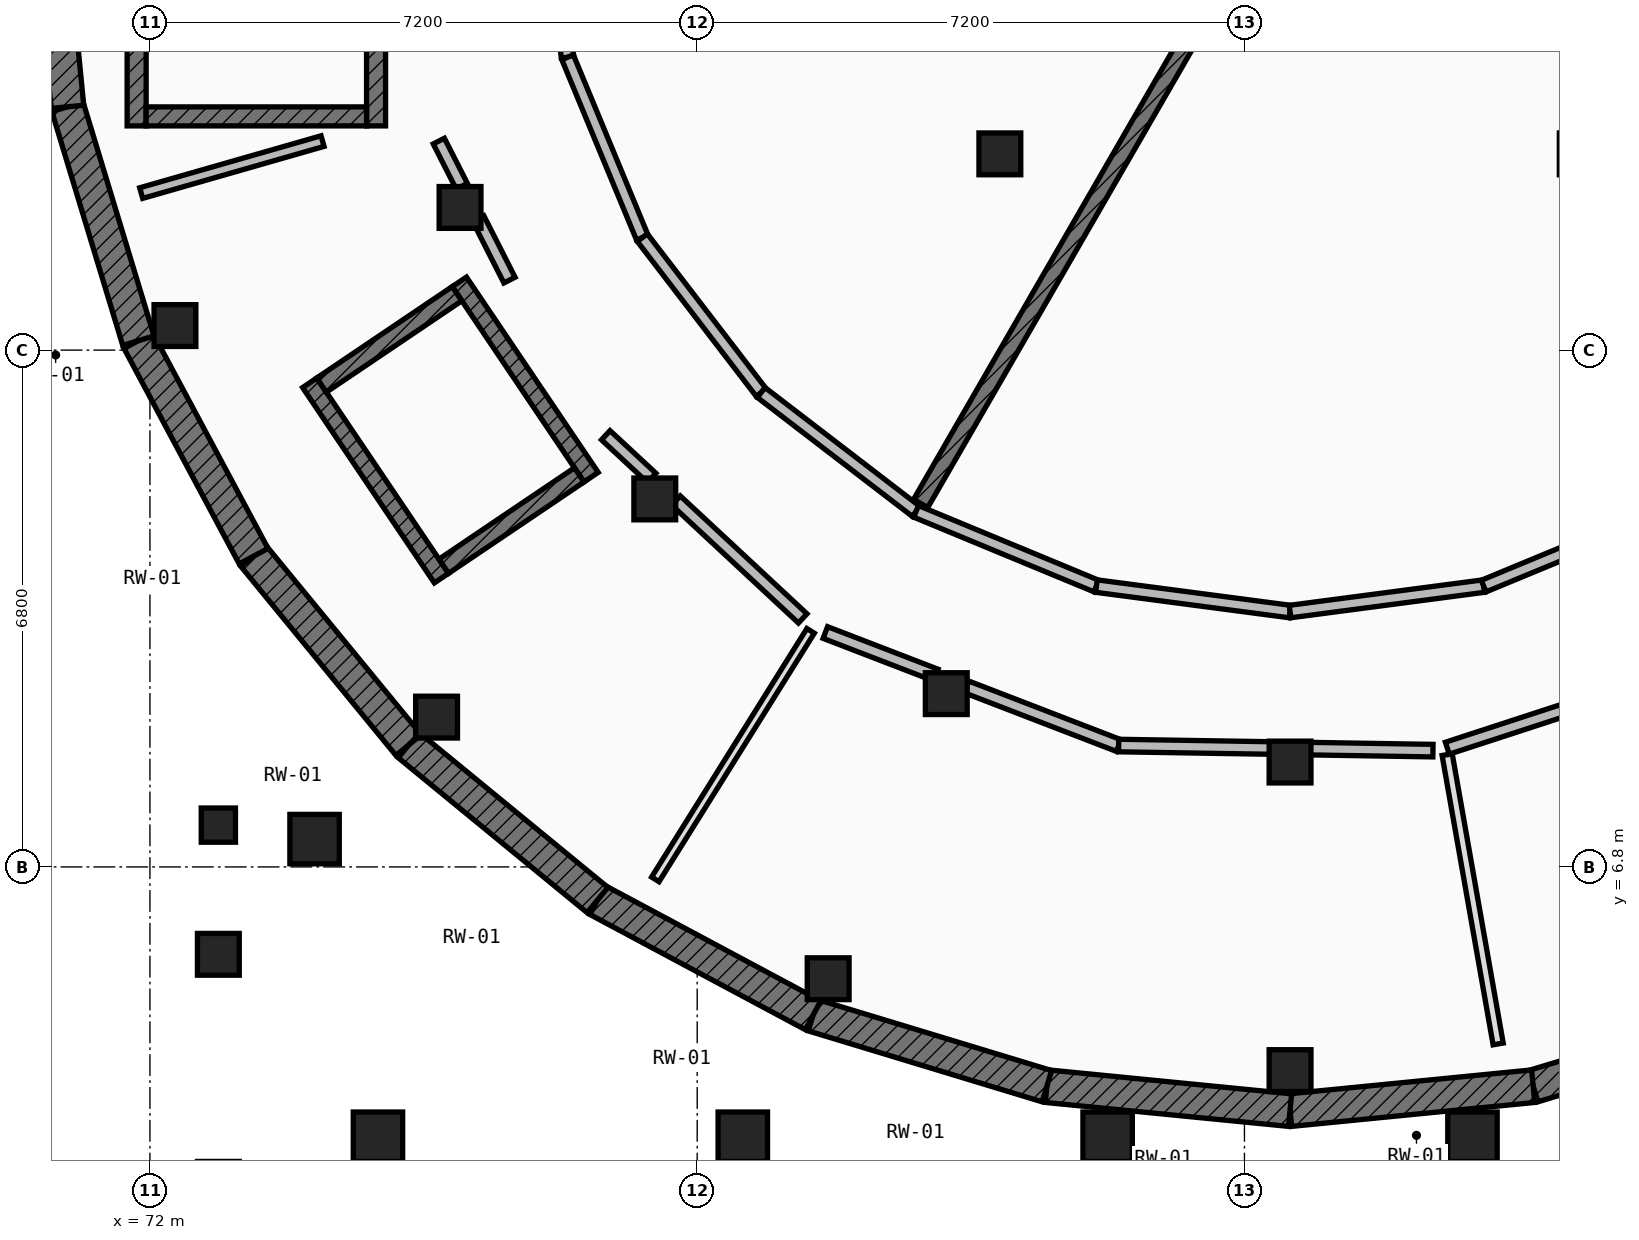
"""IFC4 building model, lengths in metres.
Left out: names, types, materials, properties, quantities, classifications, styles, units other than length and angle.
Written with IfcOpenShell. Run it as: python <this file> out.ifc"""

import sys

from ifc_helpers import new_model, si_unit, direction, frame, frame_2d, origin, origin_2d, place, context, subcontext, project, spatial, rectangle, extrude, element, fill, save


model = new_model("IFC4")
c1 = context("Model", 3, precision=1e-05, world=origin(), true_north=direction((0.0, 1.0)))
c2 = subcontext(c1, "Body", "Model", "MODEL_VIEW")
j1 = project(units=[si_unit("LENGTHUNIT", "METRE"), si_unit("PLANEANGLEUNIT", "RADIAN")], contexts=[c1])
p1 = place(None, origin())
s1 = spatial("IfcSite", under=j1, at=p1, CompositionType="ELEMENT")
p2 = place(p1, origin())
s2 = spatial("IfcBuilding", under=s1, at=p2, CompositionType="ELEMENT")
p3 = place(p2, frame((0.0, 0.0, -4.55)))
s3 = spatial("IfcBuildingStorey", under=s2, at=p3, CompositionType="ELEMENT", Elevation=-4.55)
for number, where, z_axis, x_axis in (
    (1, (72.329, 13.923, 0.0), (0.0, 0.0, 1.0), (1.0, 0.0, 0.0)),
    (2, (75.771, 8.771, 0.0), (0.0, 0.0, 1.0), (1.0, 0.0, 0.0)),
    (3, (80.923, 5.329, 0.0), (0.0, 0.0, 1.0), (1.0, 0.0, 0.0)),
    (4, (87.0, 4.12, 0.0), (0.0, 0.0, 1.0), (1.0, 0.0, 0.0)),
    (5, (76.08, 15.477, 0.0), (0.0, 0.0, 1.0), (1.0, 0.0, 0.0)),
    (6, (78.642, 11.642, 0.0), (0.0, 0.0, 1.0), (1.0, 0.0, 0.0)),
    (7, (82.477, 9.08, 0.0), (0.0, 0.0, 1.0), (1.0, 0.0, 0.0)),
    (8, (87.0, 8.18, 0.0), (0.0, 0.0, 1.0), (1.0, 0.0, 0.0)),
    (9, (83.182, 16.182, 0.0), (0.0, 0.0, 1.0), (1.0, 0.0, 0.0)),
):
    element("IfcColumn", number, at=place(p3, frame(where, z_axis=z_axis, x_axis=x_axis)), inside=s3, PredefinedType="COLUMN", context=c2, shape_type="SweptSolid", body=[
        extrude(rectangle(XDim=0.55, YDim=0.55, at=origin_2d()), origin(), (0.0, 0.0, 1.0), 4.55),
    ])
for number, where, z_axis, x_axis in (
    (10, (75.0, 3.25, 0.0), (0.0, 0.0, 1.0), (1.0, 0.0, 0.0)),
    (11, (79.8, 3.25, 0.0), (0.0, 0.0, 1.0), (1.0, 0.0, 0.0)),
    (12, (84.6, 3.25, 0.0), (0.0, 0.0, 1.0), (1.0, 0.0, 0.0)),
    (13, (89.4, 3.25, 0.0), (0.0, 0.0, 1.0), (1.0, 0.0, 0.0)),
):
    element("IfcColumn", number, at=place(p3, frame(where, z_axis=z_axis, x_axis=x_axis)), inside=s3, PredefinedType="COLUMN", context=c2, shape_type="SweptSolid", body=[
        extrude(rectangle(XDim=0.65, YDim=0.65, at=origin_2d()), origin(), (0.0, 0.0, 1.0), 4.55),
    ])
p4 = place(p3, frame((72.9, 5.65, 0.0), z_axis=(0.0, 0.0, 1.0), x_axis=(1.0, 0.0, 0.0)))
e14 = element("IfcColumn", 14, at=p4, inside=s3, PredefinedType="COLUMN", context=c2, shape_type="SweptSolid", body=[
    extrude(rectangle(XDim=0.55, YDim=0.55, at=origin_2d()), origin(), (0.0, 0.0, 1.0), 4.55),
])
p5 = place(p3, frame((74.166, 7.166, 0.0), z_axis=(0.0, 0.0, 1.0), x_axis=(1.0, 0.0, 0.0)))
e15 = element("IfcColumn", 15, at=p5, inside=s3, PredefinedType="COLUMN", context=c2, shape_type="SweptSolid", body=[
    extrude(rectangle(XDim=0.65, YDim=0.65, at=origin_2d()), origin(), (0.0, 0.0, 1.0), 4.55),
])
p6 = place(p3, frame((72.9, 7.35, 0.0), z_axis=(0.0, 0.0, 1.0), x_axis=(1.0, 0.0, 0.0)))
e16 = element("IfcColumn", 16, at=p6, inside=s3, PredefinedType="COLUMN", context=c2, shape_type="SweptSolid", body=[
    extrude(rectangle(XDim=0.45, YDim=0.45, at=origin_2d()), origin(), (0.0, 0.0, 1.0), 4.55),
])
p7 = place(p3, frame((93.276, 4.848, 0.0), z_axis=(0.0, 0.0, 1.0), x_axis=(-0.956984161567, -0.29014016356, 0.0)))
e17 = element("IfcWall", 17, at=p7, inside=s3, PredefinedType="USERDEFINED", context=c2, shape_type="SweptSolid", body=[
    extrude(rectangle(XDim=3.215, YDim=0.43, at=frame_2d((1.607, 0.0))), origin(), (0.0, 0.0, 1.0), 3.335),
])
for number, where, z_axis, x_axis in (
    (18, (90.199, 3.915, 0.0), (0.0, 0.0, 1.0), (-0.995, -0.098, 0.0)),
    (19, (87.0, 3.6, 0.0), (0.0, 0.0, 1.0), (-0.995, 0.098, 0.0)),
):
    element("IfcWall", number, at=place(p3, frame(where, z_axis=z_axis, x_axis=x_axis)), inside=s3, PredefinedType="USERDEFINED", context=c2, shape_type="SweptSolid", body=[
        extrude(rectangle(XDim=3.214, YDim=0.43, at=frame_2d((1.607, 0.0))), origin(), (0.0, 0.0, 1.0), 3.335),
    ])
for number, where, z_axis, x_axis in (
    (20, (83.801, 3.915, 0.0), (0.0, 0.0, 1.0), (-0.957, 0.29, 0.0)),
    (21, (80.724, 4.848, 0.0), (0.0, 0.0, 1.0), (-0.882, 0.472, 0.0)),
    (22, (77.889, 6.364, 0.0), (0.0, 0.0, 1.0), (-0.773, 0.634, 0.0)),
    (23, (75.403, 8.403, 0.0), (0.0, 0.0, 1.0), (-0.634, 0.773, 0.0)),
    (24, (73.364, 10.889, 0.0), (0.0, 0.0, 1.0), (-0.472, 0.882, 0.0)),
    (25, (71.848, 13.724, 0.0), (0.0, 0.0, 1.0), (-0.29, 0.957, 0.0)),
):
    element("IfcWall", number, at=place(p3, frame(where, z_axis=z_axis, x_axis=x_axis)), inside=s3, PredefinedType="USERDEFINED", context=c2, shape_type="SweptSolid", body=[
        extrude(rectangle(XDim=3.215, YDim=0.43, at=frame_2d((1.607, 0.0))), origin(), (0.0, 0.0, 1.0), 3.335),
    ])
p8 = place(p3, frame((70.915, 16.801, 0.0), z_axis=(0.0, 0.0, 1.0), x_axis=(-0.097977057849, 0.995188673637, 0.0)))
e26 = element("IfcWall", 26, at=p8, inside=s3, PredefinedType="USERDEFINED", context=c2, shape_type="SweptSolid", body=[
    extrude(rectangle(XDim=3.214, YDim=0.43, at=frame_2d((1.607, 0.0))), origin(), (0.0, 0.0, 1.0), 3.335),
])
p9 = place(p3, frame((74.975, 16.55, 0.0), z_axis=(0.0, 0.0, 1.0), x_axis=(0.0, 1.0, 0.0)))
e27 = element("IfcWall", 27, at=p9, inside=s3, PredefinedType="SHEAR", context=c2, shape_type="SweptSolid", body=[
    extrude(rectangle(XDim=6.9, YDim=0.25, at=frame_2d((3.45, 0.0))), origin(), (0.0, 0.0, 1.0), 4.135),
])
p10 = place(p9, frame((0.43, 0.0, 0.0)))
e28 = element("IfcOpeningElement", 28, at=p10, cuts=e27, PredefinedType="OPENING", context=c2, shape_type="SweptSolid", body=[
    extrude(rectangle(XDim=1.1, YDim=2.15, at=frame_2d((0.55, 1.075))), frame((0.0, 0.135, 0.0), z_axis=(0.0, -1.0, 0.0), x_axis=(1.0, 0.0, 0.0)), (0.0, 0.0, 1.0), 0.27),
])
p11 = place(p3, frame((71.825, 16.55, 0.0), z_axis=(0.0, 0.0, 1.0), x_axis=(0.0, 1.0, 0.0)))
e29 = element("IfcWall", 29, at=p11, inside=s3, PredefinedType="SHEAR", context=c2, shape_type="SweptSolid", body=[
    extrude(rectangle(XDim=6.9, YDim=0.25, at=frame_2d((3.45, 0.0))), origin(), (0.0, 0.0, 1.0), 4.135),
])
p12 = place(p3, frame((74.85, 16.675, 0.0), z_axis=(0.0, 0.0, 1.0), x_axis=(-1.0, 0.0, 0.0)))
e30 = element("IfcWall", 30, at=p12, inside=s3, PredefinedType="SHEAR", context=c2, shape_type="SweptSolid", body=[
    extrude(rectangle(XDim=2.9, YDim=0.25, at=frame_2d((1.45, 0.0))), origin(), (0.0, 0.0, 1.0), 4.135),
])
p13 = place(p3, frame((77.804, 11.928, 0.0), z_axis=(0.0, 0.0, 1.0), x_axis=(-0.559054792443, 0.829130712883, 0.0)))
e31 = element("IfcWall", 31, at=p13, inside=s3, PredefinedType="SHEAR", context=c2, shape_type="SweptSolid", body=[
    extrude(rectangle(XDim=3.1, YDim=0.225, at=frame_2d((1.55, 0.0))), origin(), (0.0, 0.0, 1.0), 4.135),
])
p14 = place(p13, frame((0.9, 0.0, 0.0)))
e32 = element("IfcOpeningElement", 32, at=p14, cuts=e31, PredefinedType="OPENING", context=c2, shape_type="SweptSolid", body=[
    extrude(rectangle(XDim=1.3, YDim=2.2, at=frame_2d((0.65, 1.1))), frame((0.0, 0.123, 0.0), z_axis=(0.0, -1.0, 0.0), x_axis=(1.0, 0.0, 0.0)), (0.0, 0.0, 1.0), 0.245),
])
p15 = place(p3, frame((75.835, 10.6, 0.0), z_axis=(0.0, 0.0, 1.0), x_axis=(-0.559091302934, 0.829106093925, 0.0)))
e33 = element("IfcWall", 33, at=p15, inside=s3, PredefinedType="SHEAR", context=c2, shape_type="SweptSolid", body=[
    extrude(rectangle(XDim=3.1, YDim=0.225, at=frame_2d((1.55, 0.0))), origin(), (0.0, 0.0, 1.0), 4.135),
])
p16 = place(p3, frame((77.648, 11.958, 0.0), z_axis=(0.0, 0.0, 1.0), x_axis=(-0.829050086962, -0.559174349652, 0.0)))
e34 = element("IfcWall", 34, at=p16, inside=s3, PredefinedType="SHEAR", context=c2, shape_type="SweptSolid", body=[
    extrude(rectangle(XDim=2.149, YDim=0.225, at=frame_2d((1.075, 0.0))), origin(), (0.0, 0.0, 1.0), 4.135),
])
p17 = place(p3, frame((76.04, 14.342, 0.0), z_axis=(0.0, 0.0, 1.0), x_axis=(-0.828997430928, -0.559252411274, 0.0)))
e35 = element("IfcWall", 35, at=p17, inside=s3, PredefinedType="SHEAR", context=c2, shape_type="SweptSolid", body=[
    extrude(rectangle(XDim=2.15, YDim=0.225, at=frame_2d((1.075, 0.0))), origin(), (0.0, 0.0, 1.0), 4.135),
])
p18 = place(p3, frame((86.55, 19.221, 0.0), z_axis=(0.0, 0.0, 1.0), x_axis=(-0.499985207697, -0.866033943956, 0.0)))
e36 = element("IfcWall", 36, at=p18, inside=s3, PredefinedType="SOLIDWALL", context=c2, shape_type="SweptSolid", body=[
    extrude(rectangle(XDim=8.821, YDim=0.215, at=frame_2d((4.41, 0.0))), origin(), (0.0, 0.0, 1.0), 2.76),
])
p19 = place(p3, frame((77.16, 20.0, 0.0), z_axis=(0.0, 0.0, 1.0), x_axis=(0.130476636685, -0.991451384224, 0.0)))
e37 = element("IfcWall", 37, at=p19, inside=s3, PredefinedType="PARTITIONING", context=c2, shape_type="SweptSolid", body=[
    extrude(rectangle(XDim=2.569, YDim=0.165, at=frame_2d((1.285, 0.0))), origin(), (0.0, 0.0, 1.0), 2.76),
])
p20 = place(p3, frame((77.495, 17.453, 0.0), z_axis=(0.0, 0.0, 1.0), x_axis=(0.382704397106, -0.923870848353, 0.0)))
e38 = element("IfcWall", 38, at=p20, inside=s3, PredefinedType="PARTITIONING", context=c2, shape_type="SweptSolid", body=[
    extrude(rectangle(XDim=2.568, YDim=0.165, at=frame_2d((1.284, 0.0))), origin(), (0.0, 0.0, 1.0), 2.76),
])
for number, where, z_axis, x_axis in (
    (39, (78.478, 15.08, 0.0), (0.0, 0.0, 1.0), (0.609, -0.793, 0.0)),
    (40, (80.042, 13.042, 0.0), (0.0, 0.0, 1.0), (0.793, -0.609, 0.0)),
):
    element("IfcWall", number, at=place(p3, frame(where, z_axis=z_axis, x_axis=x_axis)), inside=s3, PredefinedType="PARTITIONING", context=c2, shape_type="SweptSolid", body=[
        extrude(rectangle(XDim=2.569, YDim=0.165, at=frame_2d((1.285, 0.0))), origin(), (0.0, 0.0, 1.0), 2.76),
    ])
p21 = place(p3, frame((82.08, 11.478, 0.0), z_axis=(0.0, 0.0, 1.0), x_axis=(0.923870848353, -0.382704397106, 0.0)))
e41 = element("IfcWall", 41, at=p21, inside=s3, PredefinedType="PARTITIONING", context=c2, shape_type="SweptSolid", body=[
    extrude(rectangle(XDim=2.568, YDim=0.165, at=frame_2d((1.284, 0.0))), origin(), (0.0, 0.0, 1.0), 2.76),
])
for number, where, z_axis, x_axis in (
    (42, (84.453, 10.495, 0.0), (0.0, 0.0, 1.0), (0.991, -0.13, 0.0)),
    (43, (87.0, 10.16, 0.0), (0.0, 0.0, 1.0), (0.991, 0.13, 0.0)),
):
    element("IfcWall", number, at=place(p3, frame(where, z_axis=z_axis, x_axis=x_axis)), inside=s3, PredefinedType="PARTITIONING", context=c2, shape_type="SweptSolid", body=[
        extrude(rectangle(XDim=2.569, YDim=0.165, at=frame_2d((1.285, 0.0))), origin(), (0.0, 0.0, 1.0), 2.76),
    ])
p22 = place(p3, frame((89.547, 10.495, 0.0), z_axis=(0.0, 0.0, 1.0), x_axis=(0.923870848353, 0.382704397106, 0.0)))
e44 = element("IfcWall", 44, at=p22, inside=s3, PredefinedType="PARTITIONING", context=c2, shape_type="SweptSolid", body=[
    extrude(rectangle(XDim=2.568, YDim=0.165, at=frame_2d((1.284, 0.0))), origin(), (0.0, 0.0, 1.0), 2.76),
])
p23 = place(p22, frame((0.624, 0.0, 0.0)))
e45 = element("IfcOpeningElement", 45, at=p23, cuts=e44, PredefinedType="OPENING", context=c2, shape_type="SweptSolid", body=[
    extrude(rectangle(XDim=1.32, YDim=2.24, at=frame_2d((0.66, 1.12))), frame((0.0, 0.093, 0.0), z_axis=(0.0, -1.0, 0.0), x_axis=(1.0, 0.0, 0.0)), (0.0, 0.0, 1.0), 0.185),
])
p24 = place(p3, frame((74.271, 16.35, 0.0), z_axis=(0.0, 0.0, 1.0), x_axis=(-0.96127114667, -0.275604395065, 0.0)))
e46 = element("IfcWall", 46, at=p24, inside=s3, PredefinedType="PARTITIONING", context=c2, shape_type="SweptSolid", body=[
    extrude(rectangle(XDim=2.482, YDim=0.145, at=frame_2d((1.241, 0.0))), origin(), (0.0, 0.0, 1.0), 2.76),
])
p25 = place(p3, frame((80.692, 9.906, 0.0), z_axis=(0.0, 0.0, 1.0), x_axis=(-0.529850951132, -0.848090779094, 0.0)))
e47 = element("IfcWall", 47, at=p25, inside=s3, PredefinedType="PARTITIONING", context=c2, shape_type="SweptSolid", body=[
    extrude(rectangle(XDim=3.856, YDim=0.115, at=frame_2d((1.928, 0.0))), origin(), (0.0, 0.0, 1.0), 2.76),
])
p26 = place(p3, frame((89.067, 8.278, 0.0), z_axis=(0.0, 0.0, 1.0), x_axis=(0.173608798187, -0.984814695865, 0.0)))
e48 = element("IfcWall", 48, at=p26, inside=s3, PredefinedType="PLUMBINGWALL", context=c2, shape_type="SweptSolid", body=[
    extrude(rectangle(XDim=3.866, YDim=0.135, at=frame_2d((1.933, 0.0))), origin(), (0.0, 0.0, 1.0), 2.76),
])
p27 = place(p3, frame((75.801, 16.35, 0.0), z_axis=(0.0, 0.0, 1.0), x_axis=(0.453212137126, -0.891402691695, 0.0)))
e49 = element("IfcWall", 49, at=p27, inside=s3, PredefinedType="PARTITIONING", context=c2, shape_type="SweptSolid", body=[
    extrude(rectangle(XDim=0.666, YDim=0.165, at=frame_2d((0.333, 0.0))), origin(), (0.0, 0.0, 1.0), 2.76),
])
p28 = place(p3, frame((76.319, 15.331, 0.0), z_axis=(0.0, 0.0, 1.0), x_axis=(0.452366842615, -0.891831957099, 0.0)))
e50 = element("IfcWall", 50, at=p28, inside=s3, PredefinedType="PARTITIONING", context=c2, shape_type="SweptSolid", body=[
    extrude(rectangle(XDim=0.908, YDim=0.165, at=frame_2d((0.454, 0.0))), origin(), (0.0, 0.0, 1.0), 2.76),
])
p29 = place(p3, frame((77.997, 12.48, 0.0), z_axis=(0.0, 0.0, 1.0), x_axis=(0.732688002882, -0.680564684973, 0.0)))
e51 = element("IfcWall", 51, at=p29, inside=s3, PredefinedType="PARTITIONING", context=c2, shape_type="SweptSolid", body=[
    extrude(rectangle(XDim=0.824, YDim=0.165, at=frame_2d((0.412, 0.0))), origin(), (0.0, 0.0, 1.0), 2.76),
])
p30 = place(p3, frame((78.921, 11.621, 0.0), z_axis=(0.0, 0.0, 1.0), x_axis=(0.73211336643, -0.681182808572, 0.0)))
e52 = element("IfcWall", 52, at=p30, inside=s3, PredefinedType="PARTITIONING", context=c2, shape_type="SweptSolid", body=[
    extrude(rectangle(XDim=2.277, YDim=0.165, at=frame_2d((1.138, 0.0))), origin(), (0.0, 0.0, 1.0), 2.76),
])
p31 = place(p30, frame((0.659, 0.0, 0.0)))
e53 = element("IfcOpeningElement", 53, at=p31, cuts=e52, PredefinedType="OPENING", context=c2, shape_type="SweptSolid", body=[
    extrude(rectangle(XDim=0.96, YDim=2.12, at=frame_2d((0.48, 1.06))), frame((0.0, 0.093, 0.0), z_axis=(0.0, -1.0, 0.0), x_axis=(1.0, 0.0, 0.0)), (0.0, 0.0, 1.0), 0.185),
])
p32 = place(p3, frame((80.886, 9.884, 0.0), z_axis=(0.0, 0.0, 1.0), x_axis=(0.933175901825, -0.359419999796, 0.0)))
e54 = element("IfcWall", 54, at=p32, inside=s3, PredefinedType="PARTITIONING", context=c2, shape_type="SweptSolid", body=[
    extrude(rectangle(XDim=1.558, YDim=0.165, at=frame_2d((0.779, 0.0))), origin(), (0.0, 0.0, 1.0), 2.76),
])
p33 = place(p32, frame((0.304, 0.0, 0.0)))
e55 = element("IfcOpeningElement", 55, at=p33, cuts=e54, PredefinedType="OPENING", context=c2, shape_type="SweptSolid", body=[
    extrude(rectangle(XDim=0.95, YDim=2.16, at=frame_2d((0.475, 1.08))), frame((0.0, 0.093, 0.0), z_axis=(0.0, -1.0, 0.0), x_axis=(1.0, 0.0, 0.0)), (0.0, 0.0, 1.0), 0.185),
])
p34 = place(p3, frame((82.742, 9.169, 0.0), z_axis=(0.0, 0.0, 1.0), x_axis=(0.933107987924, -0.359596277613, 0.0)))
e56 = element("IfcWall", 56, at=p34, inside=s3, PredefinedType="PARTITIONING", context=c2, shape_type="SweptSolid", body=[
    extrude(rectangle(XDim=2.147, YDim=0.165, at=frame_2d((1.073, 0.0))), origin(), (0.0, 0.0, 1.0), 2.76),
])
p35 = place(p3, frame((84.745, 8.397, 0.0), z_axis=(0.0, 0.0, 1.0), x_axis=(0.999870014647, -0.016123083132, 0.0)))
e57 = element("IfcWall", 57, at=p35, inside=s3, PredefinedType="PARTITIONING", context=c2, shape_type="SweptSolid", body=[
    extrude(rectangle(XDim=2.044, YDim=0.165, at=frame_2d((1.022, 0.0))), origin(), (0.0, 0.0, 1.0), 2.76),
])
p36 = place(p3, frame((87.217, 8.357, 0.0), z_axis=(0.0, 0.0, 1.0), x_axis=(0.999869608685, -0.016148239165, 0.0)))
e58 = element("IfcWall", 58, at=p36, inside=s3, PredefinedType="PARTITIONING", context=c2, shape_type="SweptSolid", body=[
    extrude(rectangle(XDim=1.663, YDim=0.165, at=frame_2d((0.832, 0.0))), origin(), (0.0, 0.0, 1.0), 2.76),
])
p37 = place(p3, frame((89.069, 8.362, 0.0), z_axis=(0.0, 0.0, 1.0), x_axis=(0.950713418435, 0.310070953182, 0.0)))
e59 = element("IfcWall", 59, at=p37, inside=s3, PredefinedType="PARTITIONING", context=c2, shape_type="SweptSolid", body=[
    extrude(rectangle(XDim=2.287, YDim=0.165, at=frame_2d((1.143, 0.0))), origin(), (0.0, 0.0, 1.0), 2.76),
])
p38 = place(p37, frame((0.694, 0.0, 0.0)))
e60 = element("IfcOpeningElement", 60, at=p38, cuts=e59, PredefinedType="OPENING", context=c2, shape_type="SweptSolid", body=[
    extrude(rectangle(XDim=0.9, YDim=2.1, at=frame_2d((0.45, 1.05))), frame((0.0, 0.093, 0.0), z_axis=(0.0, -1.0, 0.0), x_axis=(1.0, 0.0, 0.0)), (0.0, 0.0, 1.0), 0.185),
])
p39 = place(p10, origin())
e61 = element("IfcDoor", 61, at=p39, inside=s3, OperationType="SINGLE_SWING_LEFT", PredefinedType="DOOR", context=c2, shape_type="SweptSolid", body=[
    extrude(rectangle(XDim=1.1, YDim=2.15, at=frame_2d((0.55, 1.075))), frame((0.0, 0.025, 0.0), z_axis=(0.0, -1.0, 0.0), x_axis=(1.0, 0.0, 0.0)), (0.0, 0.0, 1.0), 0.05),
])
fill(e28, e61)
p40 = place(p14, origin())
e62 = element("IfcDoor", 62, at=p40, inside=s3, OperationType="DOUBLE_DOOR_SLIDING", PredefinedType="DOOR", context=c2, shape_type="SweptSolid", body=[
    extrude(rectangle(XDim=1.3, YDim=2.2, at=frame_2d((0.65, 1.1))), frame((0.0, 0.025, 0.0), z_axis=(0.0, -1.0, 0.0), x_axis=(1.0, 0.0, 0.0)), (0.0, 0.0, 1.0), 0.05),
])
fill(e32, e62)
p41 = place(p23, origin())
e63 = element("IfcDoor", 63, at=p41, inside=s3, OperationType="SINGLE_SWING_LEFT", PredefinedType="DOOR", context=c2, shape_type="SweptSolid", body=[
    extrude(rectangle(XDim=1.32, YDim=2.24, at=frame_2d((0.66, 1.12))), frame((0.0, 0.025, 0.0), z_axis=(0.0, -1.0, 0.0), x_axis=(1.0, 0.0, 0.0)), (0.0, 0.0, 1.0), 0.05),
])
fill(e45, e63)
p42 = place(p31, origin())
e64 = element("IfcDoor", 64, at=p42, inside=s3, OperationType="SINGLE_SWING_RIGHT", PredefinedType="DOOR", context=c2, shape_type="SweptSolid", body=[
    extrude(rectangle(XDim=0.96, YDim=2.12, at=frame_2d((0.48, 1.06))), frame((0.0, 0.025, 0.0), z_axis=(0.0, -1.0, 0.0), x_axis=(1.0, 0.0, 0.0)), (0.0, 0.0, 1.0), 0.05),
])
fill(e53, e64)
p43 = place(p33, origin())
e65 = element("IfcDoor", 65, at=p43, inside=s3, OperationType="SINGLE_SWING_LEFT", PredefinedType="DOOR", context=c2, shape_type="SweptSolid", body=[
    extrude(rectangle(XDim=0.95, YDim=2.16, at=frame_2d((0.475, 1.08))), frame((0.0, 0.025, 0.0), z_axis=(0.0, -1.0, 0.0), x_axis=(1.0, 0.0, 0.0)), (0.0, 0.0, 1.0), 0.05),
])
fill(e55, e65)
p44 = place(p38, origin())
e66 = element("IfcDoor", 66, at=p44, inside=s3, OperationType="SINGLE_SWING_RIGHT", PredefinedType="DOOR", context=c2, shape_type="SweptSolid", body=[
    extrude(rectangle(XDim=0.9, YDim=2.1, at=frame_2d((0.45, 1.05))), frame((0.0, 0.025, 0.0), z_axis=(0.0, -1.0, 0.0), x_axis=(1.0, 0.0, 0.0)), (0.0, 0.0, 1.0), 0.05),
])
fill(e60, e66)
save(model, sys.argv[1])
